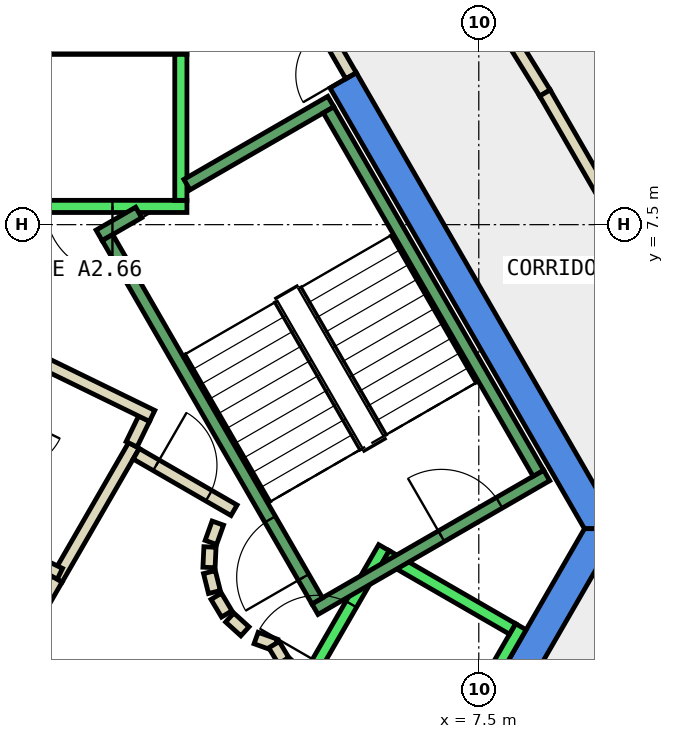
"""IFC4 building model, lengths in metres.
Left out: names, types, materials, properties, quantities, classifications, styles, units other than length and angle.
Written with IfcOpenShell. Run it as: python <this file> out.ifc"""

import sys

from ifc_helpers import new_model, si_unit, direction, frame, frame_2d, origin, place, context, subcontext, project, spatial, polyline, rectangle, outline, extrude, element, fill, save


model = new_model("IFC4")
c1 = context("Model", 3, precision=1e-05, world=origin(), true_north=direction((0.0, 1.0)))
c2 = subcontext(c1, "Body", "Model", "MODEL_VIEW")
j1 = project(units=[si_unit("LENGTHUNIT", "METRE"), si_unit("PLANEANGLEUNIT", "RADIAN")], contexts=[c1])
p1 = place(None, origin())
s1 = spatial("IfcSite", under=j1, at=p1, CompositionType="ELEMENT")
p2 = place(p1, origin())
s2 = spatial("IfcBuilding", under=s1, at=p2, CompositionType="ELEMENT")
p3 = place(p2, frame((0.0, 0.0, 315.2)))
s3 = spatial("IfcBuildingStorey", under=s2, at=p3, CompositionType="ELEMENT", Elevation=315.2)
p4 = place(p3, frame((0.0, 0.0, -0.34)))
e1 = element("IfcWall", 1, at=p4, inside=s3, PredefinedType="SHEAR", context=c2, shape_type="SweptSolid", body=[
    extrude(outline(polyline([(5.486, 9.998), (5.053, 9.748), (9.238, 2.5), (9.815, 2.5), (5.486, 9.998)])), origin(), (0.0, 0.0, 1.0), 3.6),
])
p5 = place(p3, frame((0.0, 0.0, -0.34)))
e2 = element("IfcWall", 2, at=p5, inside=s3, PredefinedType="SHEAR", context=c2, shape_type="SweptSolid", body=[
    extrude(outline(polyline([(4.907, -6.0), (9.815, 2.5), (9.238, 2.5), (4.619, -5.5), (4.907, -6.0)])), origin(), (0.0, 0.0, 1.0), 3.6),
])
p6 = place(p3, frame((0.56, 1.671, 0.0), z_axis=(0.0, 0.0, 1.0), x_axis=(0.500008334558, 0.866020591771, 0.0)))
e3 = element("IfcWall", 3, at=p6, inside=s3, PredefinedType="PARTITIONING", context=c2, shape_type="SweptSolid", body=[
    extrude(rectangle(XDim=2.538, YDim=0.2, at=frame_2d((1.269, 0.0))), origin(), (0.0, 0.0, 1.0), 3.26),
])
p7 = place(p3, frame((1.79, 3.888, 0.0), z_axis=(0.0, 0.0, 1.0), x_axis=(0.437807406823, 0.899068781869, 0.0)))
e4 = element("IfcWall", 4, at=p7, inside=s3, PredefinedType="PARTITIONING", context=c2, shape_type="SweptSolid", body=[
    extrude(rectangle(XDim=0.469, YDim=0.2, at=frame_2d((0.234, 0.0))), origin(), (0.0, 0.0, 1.0), 3.26),
])
p8 = place(p3, frame((2.128, 4.355, 0.0), z_axis=(0.0, 0.0, 1.0), x_axis=(-0.898876404494, 0.438202247191, 0.0)))
e5 = element("IfcWall", 5, at=p8, inside=s3, PredefinedType="PARTITIONING", context=c2, shape_type="SweptSolid", body=[
    extrude(rectangle(XDim=1.999, YDim=0.2, at=frame_2d((1.0, 0.0))), origin(), (0.0, 0.0, 1.0), 3.26),
])
p9 = place(p3, frame((-0.984, 2.535, 0.0), z_axis=(0.0, 0.0, 1.0), x_axis=(0.898707583217, -0.438548378025, 0.0)))
e6 = element("IfcWall", 6, at=p9, inside=s3, PredefinedType="PARTITIONING", context=c2, shape_type="SweptSolid", body=[
    extrude(rectangle(XDim=1.774, YDim=0.2, at=frame_2d((0.887, 0.0))), origin(), (0.0, 0.0, 1.0), 3.26),
])
p10 = place(p3, frame((4.454, 16.364, 0.0), z_axis=(0.0, 0.0, 1.0), x_axis=(0.525142215688, -0.851014484778, 0.0)))
e7 = element("IfcWall", 7, at=p10, inside=s3, PredefinedType="PARTITIONING", context=c2, shape_type="SweptSolid", body=[
    extrude(rectangle(XDim=7.872, YDim=0.2, at=frame_2d((3.936, 0.0))), origin(), (0.0, 0.0, 1.0), 3.26),
])
p11 = place(p3, frame((8.588, 9.665, 0.0), z_axis=(0.0, 0.0, 1.0), x_axis=(0.499946799636, -0.86605611685, 0.0)))
e8 = element("IfcWall", 8, at=p11, inside=s3, PredefinedType="PARTITIONING", context=c2, shape_type="SweptSolid", body=[
    extrude(rectangle(XDim=8.227, YDim=0.2, at=frame_2d((4.114, 0.0))), origin(), (0.0, 0.0, 1.0), 3.26),
])
p12 = place(p11, frame((3.613, 0.0, 0.0)))
e9 = element("IfcOpeningElement", 9, at=p12, cuts=e8, PredefinedType="OPENING", context=c2, shape_type="SweptSolid", body=[
    extrude(rectangle(XDim=1.0, YDim=2.1, at=frame_2d((0.5, 1.05))), frame((0.0, 0.11, 0.0), z_axis=(0.0, -1.0, 0.0), x_axis=(1.0, 0.0, 0.0)), (0.0, 0.0, 1.0), 0.22),
])
p13 = place(p3, frame((0.05, 0.787, 0.0), z_axis=(0.0, 0.0, 1.0), x_axis=(0.499819111317, 0.866129814729, 0.0)))
e10 = element("IfcWall", 10, at=p13, inside=s3, PredefinedType="PARTITIONING", context=c2, shape_type="SweptSolid", body=[
    extrude(rectangle(XDim=1.021, YDim=0.2, at=frame_2d((0.51, 0.0))), origin(), (0.0, 0.0, 1.0), 3.26),
])
p14 = place(p3, frame((1.866, 3.732, 0.0), z_axis=(0.0, 0.0, 1.0), x_axis=(0.866043361281, -0.499968895414, 0.0)))
e11 = element("IfcWall", 11, at=p14, inside=s3, PredefinedType="PARTITIONING", context=c2, shape_type="SweptSolid", body=[
    extrude(rectangle(XDim=1.858, YDim=0.2, at=frame_2d((0.929, 0.0))), origin(), (0.0, 0.0, 1.0), 3.26),
])
p15 = place(p14, frame((0.379, 0.0, 0.0)))
e12 = element("IfcOpeningElement", 12, at=p15, cuts=e11, PredefinedType="OPENING", context=c2, shape_type="SweptSolid", body=[
    extrude(rectangle(XDim=1.0, YDim=2.1, at=frame_2d((0.5, 1.05))), frame((0.0, 0.11, 0.0), z_axis=(0.0, -1.0, 0.0), x_axis=(1.0, 0.0, 0.0)), (0.0, 0.0, 1.0), 0.22),
])
p16 = place(p3, frame((3.208, 2.592, 0.0), z_axis=(0.0, 0.0, 1.0), x_axis=(-0.337388820924, -0.941365382578, 0.0)))
e13 = element("IfcWall", 13, at=p16, inside=s3, PredefinedType="PARTITIONING", context=c2, shape_type="SweptSolid", body=[
    extrude(rectangle(XDim=0.338, YDim=0.2, at=frame_2d((0.169, 0.0))), origin(), (0.0, 0.0, 1.0), 3.26),
])
p17 = place(p3, frame((3.079, 2.199, 0.0), z_axis=(0.0, 0.0, 1.0), x_axis=(-0.047771483479, -0.998858290933, 0.0)))
e14 = element("IfcWall", 14, at=p17, inside=s3, PredefinedType="PARTITIONING", context=c2, shape_type="SweptSolid", body=[
    extrude(rectangle(XDim=0.337, YDim=0.2, at=frame_2d((0.169, 0.0))), origin(), (0.0, 0.0, 1.0), 3.26),
])
p18 = place(p3, frame((3.07, 1.786, 0.0), z_axis=(0.0, 0.0, 1.0), x_axis=(0.242705583207, -0.970099994784, 0.0)))
e15 = element("IfcWall", 15, at=p18, inside=s3, PredefinedType="PARTITIONING", context=c2, shape_type="SweptSolid", body=[
    extrude(rectangle(XDim=0.338, YDim=0.2, at=frame_2d((0.169, 0.0))), origin(), (0.0, 0.0, 1.0), 3.26),
])
for number, where, z_axis, x_axis in (
    (16, (3.182, 1.388, 0.0), (0.0, 0.0, 1.0), (0.512, -0.859, 0.0)),
    (17, (3.404, 1.039, 0.0), (0.0, 0.0, 1.0), (0.74, -0.672, 0.0)),
):
    element("IfcWall", number, at=place(p3, frame(where, z_axis=z_axis, x_axis=x_axis)), inside=s3, PredefinedType="PARTITIONING", context=c2, shape_type="SweptSolid", body=[
        extrude(rectangle(XDim=0.338, YDim=0.2, at=frame_2d((0.169, 0.0))), origin(), (0.0, 0.0, 1.0), 3.26),
    ])
p19 = place(p3, frame((3.838, 0.702, 0.0), z_axis=(0.0, 0.0, 1.0), x_axis=(0.941035081519, -0.338308993895, 0.0)))
e18 = element("IfcWall", 18, at=p19, inside=s3, PredefinedType="PARTITIONING", context=c2, shape_type="SweptSolid", body=[
    extrude(rectangle(XDim=0.337, YDim=0.2, at=frame_2d((0.168, 0.0))), origin(), (0.0, 0.0, 1.0), 3.26),
])
p20 = place(p3, frame((4.132, 0.593, 0.0), z_axis=(0.0, 0.0, 1.0), x_axis=(0.513561617048, -0.858052717201, 0.0)))
e19 = element("IfcWall", 19, at=p20, inside=s3, PredefinedType="PARTITIONING", context=c2, shape_type="SweptSolid", body=[
    extrude(rectangle(XDim=0.308, YDim=0.2, at=frame_2d((0.154, 0.0))), origin(), (0.0, 0.0, 1.0), 3.26),
])
p21 = place(p3, frame((4.301, 0.315, 0.0), z_axis=(0.0, 0.0, 1.0), x_axis=(0.741798017506, -0.670623367639, 0.0)))
e20 = element("IfcWall", 20, at=p21, inside=s3, PredefinedType="PARTITIONING", context=c2, shape_type="SweptSolid", body=[
    extrude(rectangle(XDim=0.309, YDim=0.2, at=frame_2d((0.154, 0.0))), origin(), (0.0, 0.0, 1.0), 3.26),
])
p22 = place(p3, frame((5.399, 9.948, 0.0), z_axis=(0.0, 0.0, 1.0), x_axis=(-0.499882215713, 0.866093395895, 0.0)))
e21 = element("IfcWall", 21, at=p22, inside=s3, PredefinedType="PARTITIONING", context=c2, shape_type="SweptSolid", body=[
    extrude(rectangle(XDim=0.926, YDim=0.2, at=frame_2d((0.463, 0.0))), origin(), (0.0, 0.0, 1.0), 2.4),
])
p23 = place(p22, frame((0.017, 0.0, 0.0)))
e22 = element("IfcOpeningElement", 22, at=p23, cuts=e21, PredefinedType="OPENING", context=c2, shape_type="SweptSolid", body=[
    extrude(rectangle(XDim=0.9, YDim=2.1, at=frame_2d((0.45, 1.05))), frame((0.0, 0.11, 0.0), z_axis=(0.0, -1.0, 0.0), x_axis=(1.0, 0.0, 0.0)), (0.0, 0.0, 1.0), 0.22),
])
p24 = place(p3, frame((2.7, 7.8, 0.0), z_axis=(0.0, 0.0, 1.0), x_axis=(-1.0, 0.0, 0.0)))
e23 = element("IfcWall", 23, at=p24, inside=s3, PredefinedType="STANDARD", context=c2, shape_type="SweptSolid", body=[
    extrude(rectangle(XDim=5.4, YDim=0.2, at=frame_2d((2.7, 0.0))), origin(), (0.0, 0.0, 1.0), 3.26),
])
p25 = place(p24, frame((1.225, 0.0, 0.0)))
e24 = element("IfcOpeningElement", 24, at=p25, cuts=e23, PredefinedType="OPENING", context=c2, shape_type="SweptSolid", body=[
    extrude(rectangle(XDim=1.1, YDim=2.1, at=frame_2d((0.55, 1.05))), frame((0.0, 0.11, 0.0), z_axis=(0.0, -1.0, 0.0), x_axis=(1.0, 0.0, 0.0)), (0.0, 0.0, 1.0), 0.22),
])
p26 = place(p24, frame((3.075, 0.0, 0.0)))
e25 = element("IfcOpeningElement", 25, at=p26, cuts=e23, PredefinedType="OPENING", context=c2, shape_type="SweptSolid", body=[
    extrude(rectangle(XDim=1.1, YDim=2.1, at=frame_2d((0.55, 1.05))), frame((0.0, 0.11, 0.0), z_axis=(0.0, -1.0, 0.0), x_axis=(1.0, 0.0, 0.0)), (0.0, 0.0, 1.0), 0.22),
])
p27 = place(p3, frame((2.7, 10.4, 0.0), z_axis=(0.0, 0.0, 1.0), x_axis=(-1.0, 0.0, 0.0)))
e26 = element("IfcWall", 26, at=p27, inside=s3, PredefinedType="STANDARD", context=c2, shape_type="SweptSolid", body=[
    extrude(rectangle(XDim=5.4, YDim=0.2, at=frame_2d((2.7, 0.0))), origin(), (0.0, 0.0, 1.0), 3.26),
])
p28 = place(p3, frame((2.6, 7.9, 0.0), z_axis=(0.0, 0.0, 1.0), x_axis=(0.0, 1.0, 0.0)))
e27 = element("IfcWall", 27, at=p28, inside=s3, PredefinedType="STANDARD", context=c2, shape_type="SweptSolid", body=[
    extrude(rectangle(XDim=2.4, YDim=0.2, at=frame_2d((1.2, 0.0))), origin(), (0.0, 0.0, 1.0), 3.26),
])
p29 = place(p3, frame((3.24, -2.488, 0.0), z_axis=(0.0, 0.0, 1.0), x_axis=(0.500034260056, 0.866005622828, 0.0)))
e28 = element("IfcWall", 28, at=p29, inside=s3, PredefinedType="STANDARD", context=c2, shape_type="SweptSolid", body=[
    extrude(rectangle(XDim=5.399, YDim=0.2, at=frame_2d((2.7, 0.0))), origin(), (0.0, 0.0, 1.0), 3.26),
])
p30 = place(p29, frame((3.225, 0.0, 0.0)))
e29 = element("IfcOpeningElement", 29, at=p30, cuts=e28, PredefinedType="OPENING", context=c2, shape_type="SweptSolid", body=[
    extrude(rectangle(XDim=1.1, YDim=2.1, at=frame_2d((0.55, 1.05))), frame((0.0, 0.11, 0.0), z_axis=(0.0, -1.0, 0.0), x_axis=(1.0, 0.0, 0.0)), (0.0, 0.0, 1.0), 0.22),
])
p31 = place(p29, frame((1.225, 0.0, 0.0)))
e30 = element("IfcOpeningElement", 30, at=p31, cuts=e28, PredefinedType="OPENING", context=c2, shape_type="SweptSolid", body=[
    extrude(rectangle(XDim=1.1, YDim=2.1, at=frame_2d((0.55, 1.05))), frame((0.0, 0.11, 0.0), z_axis=(0.0, -1.0, 0.0), x_axis=(1.0, 0.0, 0.0)), (0.0, 0.0, 1.0), 0.22),
])
p32 = place(p3, frame((5.492, -3.788, 0.0), z_axis=(0.0, 0.0, 1.0), x_axis=(0.500034260056, 0.866005622828, 0.0)))
e31 = element("IfcWall", 31, at=p32, inside=s3, PredefinedType="STANDARD", context=c2, shape_type="SweptSolid", body=[
    extrude(rectangle(XDim=5.399, YDim=0.2, at=frame_2d((2.7, 0.0))), origin(), (0.0, 0.0, 1.0), 3.26),
])
p33 = place(p3, frame((5.977, 2.052, 0.0), z_axis=(0.0, 0.0, 1.0), x_axis=(0.865973769406, -0.500089422704, 0.0)))
e32 = element("IfcWall", 32, at=p33, inside=s3, PredefinedType="STANDARD", context=c2, shape_type="SweptSolid", body=[
    extrude(rectangle(XDim=2.399, YDim=0.2, at=frame_2d((1.2, 0.0))), origin(), (0.0, 0.0, 1.0), 3.26),
])
p34 = place(p3, frame((4.806, 1.176, 0.0), z_axis=(0.0, 0.0, 1.0), x_axis=(0.866059941101, 0.499940174841, 0.0)))
e33 = element("IfcWall", 33, at=p34, inside=s3, PredefinedType="STANDARD", context=c2, shape_type="SweptSolid", body=[
    extrude(rectangle(XDim=4.4, YDim=0.2, at=frame_2d((2.2, 0.0))), origin(), (0.0, 0.0, 1.0), 3.26),
])
p35 = place(p34, frame((2.4, 0.0, 0.0)))
e34 = element("IfcOpeningElement", 34, at=p35, cuts=e33, PredefinedType="OPENING", context=c2, shape_type="SweptSolid", body=[
    extrude(rectangle(XDim=1.1, YDim=2.2, at=frame_2d((0.55, 1.1))), frame((0.0, 0.11, 0.0), z_axis=(0.0, -1.0, 0.0), x_axis=(1.0, 0.0, 0.0)), (0.0, 0.0, 1.0), 0.22),
])
p36 = place(p3, frame((2.7, 8.158, 0.0), z_axis=(0.0, 0.0, 1.0), x_axis=(0.86611865017, 0.499838457731, 0.0)))
e35 = element("IfcWall", 35, at=p36, inside=s3, PredefinedType="STANDARD", context=c2, shape_type="SweptSolid", body=[
    extrude(rectangle(XDim=2.733, YDim=0.2, at=frame_2d((1.366, 0.0))), origin(), (0.0, 0.0, 1.0), 3.26),
])
p37 = place(p3, frame((1.256, 7.324, 0.0), z_axis=(0.0, 0.0, 1.0), x_axis=(0.865915093549, 0.500191014278, 0.0)))
e36 = element("IfcWall", 36, at=p37, inside=s3, PredefinedType="STANDARD", context=c2, shape_type="SweptSolid", body=[
    extrude(rectangle(XDim=0.752, YDim=0.2, at=frame_2d((0.376, 0.0))), origin(), (0.0, 0.0, 1.0), 3.26),
])
p38 = place(p3, frame((4.843, 1.312, 0.0), z_axis=(0.0, 0.0, 1.0), x_axis=(-0.499963383562, 0.866046543262, 0.0)))
e37 = element("IfcWall", 37, at=p38, inside=s3, PredefinedType="STANDARD", context=c2, shape_type="SweptSolid", body=[
    extrude(rectangle(XDim=6.9, YDim=0.2, at=frame_2d((3.45, 0.0))), origin(), (0.0, 0.0, 1.0), 3.26),
])
p39 = place(p38, frame((0.45, 0.0, 0.0)))
e38 = element("IfcOpeningElement", 38, at=p39, cuts=e37, PredefinedType="OPENING", context=c2, shape_type="SweptSolid", body=[
    extrude(rectangle(XDim=1.1, YDim=2.2, at=frame_2d((0.55, 1.1))), frame((0.0, 0.11, 0.0), z_axis=(0.0, -1.0, 0.0), x_axis=(1.0, 0.0, 0.0)), (0.0, 0.0, 1.0), 0.22),
])
p40 = place(p3, frame((8.48, 3.412, 0.0), z_axis=(0.0, 0.0, 1.0), x_axis=(-0.499978703459, 0.866037698999, 0.0)))
e39 = element("IfcWall", 39, at=p40, inside=s3, PredefinedType="STANDARD", context=c2, shape_type="SweptSolid", body=[
    extrude(rectangle(XDim=6.9, YDim=0.2, at=frame_2d((3.45, 0.0))), origin(), (0.0, 0.0, 1.0), 3.26),
])
p41 = place(p15, origin())
e40 = element("IfcDoor", 40, at=p41, inside=s3, OperationType="SINGLE_SWING_LEFT", PredefinedType="DOOR", context=c2, shape_type="SweptSolid", body=[
    extrude(rectangle(XDim=1.0, YDim=2.1, at=frame_2d((0.5, 1.05))), frame((0.0, 0.025, 0.0), z_axis=(0.0, -1.0, 0.0), x_axis=(1.0, 0.0, 0.0)), (0.0, 0.0, 1.0), 0.05),
])
fill(e12, e40)
p42 = place(p23, origin())
e41 = element("IfcDoor", 41, at=p42, inside=s3, OperationType="SINGLE_SWING_LEFT", PredefinedType="DOOR", context=c2, shape_type="SweptSolid", body=[
    extrude(rectangle(XDim=0.9, YDim=2.1, at=frame_2d((0.45, 1.05))), frame((0.0, 0.025, 0.0), z_axis=(0.0, -1.0, 0.0), x_axis=(1.0, 0.0, 0.0)), (0.0, 0.0, 1.0), 0.05),
])
fill(e22, e41)
p43 = place(p25, origin())
e42 = element("IfcDoor", 42, at=p43, inside=s3, OperationType="SLIDING_TO_LEFT", PredefinedType="DOOR", context=c2, shape_type="SweptSolid", body=[
    extrude(rectangle(XDim=1.1, YDim=2.1, at=frame_2d((0.55, 1.05))), frame((0.0, 0.025, 0.0), z_axis=(0.0, -1.0, 0.0), x_axis=(1.0, 0.0, 0.0)), (0.0, 0.0, 1.0), 0.05),
])
fill(e24, e42)
p44 = place(p30, origin())
e43 = element("IfcDoor", 43, at=p44, inside=s3, OperationType="SLIDING_TO_LEFT", PredefinedType="DOOR", context=c2, shape_type="SweptSolid", body=[
    extrude(rectangle(XDim=1.1, YDim=2.1, at=frame_2d((0.55, 1.05))), frame((0.0, 0.025, 0.0), z_axis=(0.0, -1.0, 0.0), x_axis=(1.0, 0.0, 0.0)), (0.0, 0.0, 1.0), 0.05),
])
fill(e29, e43)
p45 = place(p39, origin())
e44 = element("IfcDoor", 44, at=p45, inside=s3, OperationType="SINGLE_SWING_LEFT", PredefinedType="DOOR", context=c2, shape_type="SweptSolid", body=[
    extrude(rectangle(XDim=1.1, YDim=2.2, at=frame_2d((0.55, 1.1))), frame((0.0, 0.025, 0.0), z_axis=(0.0, -1.0, 0.0), x_axis=(1.0, 0.0, 0.0)), (0.0, 0.0, 1.0), 0.05),
])
fill(e38, e44)
p46 = place(p35, origin())
e45 = element("IfcDoor", 45, at=p46, inside=s3, OperationType="SINGLE_SWING_LEFT", PredefinedType="DOOR", context=c2, shape_type="SweptSolid", body=[
    extrude(rectangle(XDim=1.1, YDim=2.2, at=frame_2d((0.55, 1.1))), frame((0.0, 0.025, 0.0), z_axis=(0.0, -1.0, 0.0), x_axis=(1.0, 0.0, 0.0)), (0.0, 0.0, 1.0), 0.05),
])
fill(e34, e45)
save(model, sys.argv[1])
